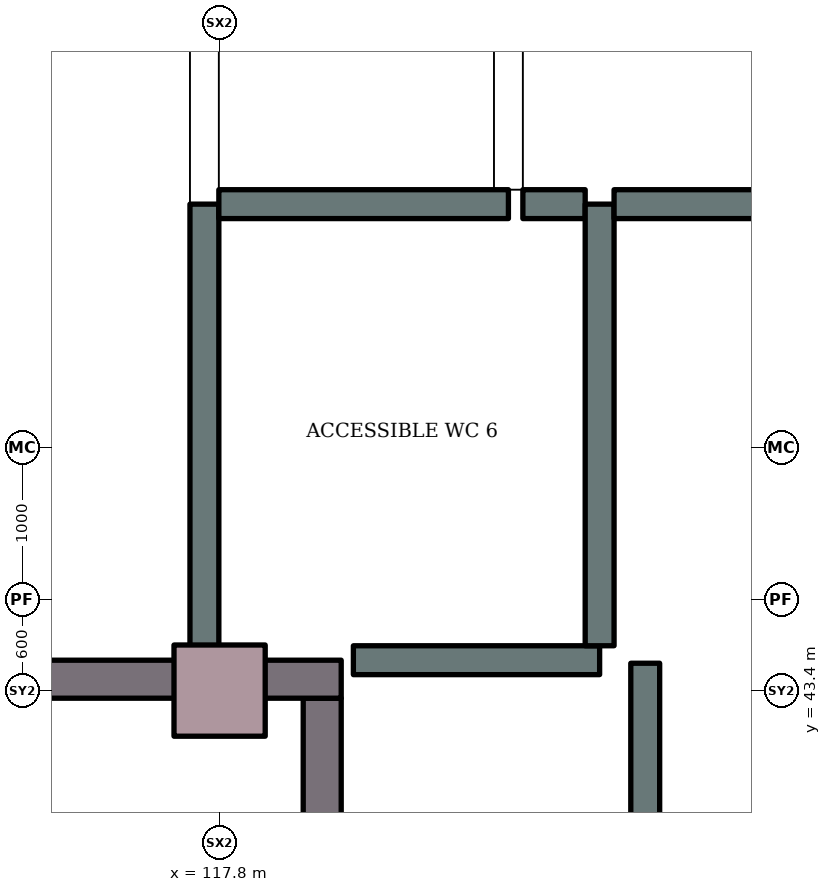
"""IFC4 building model, lengths in metres.
Left out: names, types, materials, properties, quantities, classifications, styles, units other than length and angle.
Written with IfcOpenShell. Run it as: python <this file> out.ifc"""

import sys

from ifc_helpers import new_model, si_unit, direction, frame, frame_2d, origin, origin_2d, place, context, subcontext, project, spatial, rectangle, extrude, element, fill, save


model = new_model("IFC4")
c1 = context("Model", 3, precision=1e-05, world=origin(), true_north=direction((0.0, 1.0)))
c2 = subcontext(c1, "Body", "Model", "MODEL_VIEW")
j1 = project(units=[si_unit("LENGTHUNIT", "METRE"), si_unit("PLANEANGLEUNIT", "RADIAN")], contexts=[c1])
p1 = place(None, origin())
s1 = spatial("IfcSite", under=j1, at=p1, CompositionType="ELEMENT")
p2 = place(p1, origin())
s2 = spatial("IfcBuilding", under=s1, at=p2, CompositionType="ELEMENT")
p3 = place(p2, origin())
s3 = spatial("IfcBuildingStorey", under=s2, at=p3, CompositionType="ELEMENT", Elevation=0.0)
p4 = place(p3, frame((117.8, 43.4, 0.0), z_axis=(0.0, 0.0, 1.0), x_axis=(1.0, 0.0, 0.0)))
e1 = element("IfcColumn", 1, at=p4, inside=s3, PredefinedType="COLUMN", context=c2, shape_type="SweptSolid", body=[
    extrude(rectangle(XDim=0.6, YDim=0.6, at=origin_2d()), origin(), (0.0, 0.0, 1.0), 4.2),
])
p5 = place(p3, frame((118.475, 38.4, 0.0), z_axis=(0.0, 0.0, 1.0), x_axis=(0.0, 1.0, 0.0)))
e2 = element("IfcWall", 2, at=p5, inside=s3, PredefinedType="SHEAR", context=c2, shape_type="SweptSolid", body=[
    extrude(rectangle(XDim=4.95, YDim=0.25, at=frame_2d((2.475, 0.0))), origin(), (0.0, 0.0, 1.0), 4.2),
])
p6 = place(p3, frame((112.4, 43.475, 0.0), z_axis=(0.0, 0.0, 1.0), x_axis=(1.0, 0.0, 0.0)))
e3 = element("IfcWall", 3, at=p6, inside=s3, PredefinedType="SHEAR", context=c2, shape_type="SweptSolid", body=[
    extrude(rectangle(XDim=6.2, YDim=0.25, at=frame_2d((3.1, 0.0))), origin(), (0.0, 0.0, 1.0), 4.2),
])
p7 = place(p6, frame((3.714, 0.0, 0.0)))
e4 = element("IfcOpeningElement", 4, at=p7, cuts=e3, PredefinedType="OPENING", context=c2, shape_type="SweptSolid", body=[
    extrude(rectangle(XDim=1.0, YDim=2.1, at=frame_2d((0.5, 1.05))), frame((0.0, 0.135, 0.0), z_axis=(0.0, -1.0, 0.0), x_axis=(1.0, 0.0, 0.0)), (0.0, 0.0, 1.0), 0.27),
])
p8 = place(p3, frame((117.7, 43.68, 0.0), z_axis=(0.0, 0.0, 1.0), x_axis=(0.0, 1.0, 0.0)))
e5 = element("IfcWall", 5, at=p8, inside=s3, PredefinedType="PARTITIONING", context=c2, shape_type="SweptSolid", body=[
    extrude(rectangle(XDim=2.92, YDim=0.19, at=frame_2d((1.46, 0.0))), origin(), (0.0, 0.0, 1.0), 3.9),
])
p9 = place(p3, frame((117.7, 46.6, 0.0), z_axis=(0.0, 0.0, 1.0), x_axis=(0.0, 1.0, 0.0)))
e6 = element("IfcWall", 6, at=p9, inside=s3, PredefinedType="PARTITIONING", context=c2, shape_type="SweptSolid", body=[
    extrude(rectangle(XDim=11.58, YDim=0.19, at=frame_2d((5.79, 0.0))), origin(), (0.0, 0.0, 1.0), 3.9),
])
p10 = place(p9, frame((5.35, 0.0, 0.0)))
e7 = element("IfcOpeningElement", 7, at=p10, cuts=e6, PredefinedType="OPENING", context=c2, shape_type="SweptSolid", body=[
    extrude(rectangle(XDim=1.0, YDim=2.1, at=frame_2d((0.5, 1.05))), frame((0.0, 0.105, 0.0), z_axis=(0.0, -1.0, 0.0), x_axis=(1.0, 0.0, 0.0)), (0.0, 0.0, 1.0), 0.21),
])
p11 = place(p3, frame((119.7, 46.6, 0.0), z_axis=(0.0, 0.0, 1.0), x_axis=(-1.0, 0.0, 0.0)))
e8 = element("IfcWall", 8, at=p11, inside=s3, PredefinedType="PARTITIONING", context=c2, shape_type="SweptSolid", body=[
    extrude(rectangle(XDim=1.905, YDim=0.19, at=frame_2d((0.953, 0.0))), origin(), (0.0, 0.0, 1.0), 3.9),
])
p12 = place(p11, frame((0.55, 0.0, 0.0)))
e9 = element("IfcOpeningElement", 9, at=p12, cuts=e8, PredefinedType="OPENING", context=c2, shape_type="SweptSolid", body=[
    extrude(rectangle(XDim=0.9, YDim=2.1, at=frame_2d((0.45, 1.05))), frame((0.0, 0.105, 0.0), z_axis=(0.0, -1.0, 0.0), x_axis=(1.0, 0.0, 0.0)), (0.0, 0.0, 1.0), 0.21),
])
p13 = place(p3, frame((119.7, 46.695, 0.0), z_axis=(0.0, 0.0, 1.0), x_axis=(0.0, 1.0, 0.0)))
e10 = element("IfcWall", 10, at=p13, inside=s3, PredefinedType="PARTITIONING", context=c2, shape_type="SweptSolid", body=[
    extrude(rectangle(XDim=6.305, YDim=0.19, at=frame_2d((3.152, 0.0))), origin(), (0.0, 0.0, 1.0), 3.9),
])
p14 = place(p13, frame((2.655, 0.0, 0.0)))
e11 = element("IfcOpeningElement", 11, at=p14, cuts=e10, PredefinedType="OPENING", context=c2, shape_type="SweptSolid", body=[
    extrude(rectangle(XDim=1.0, YDim=2.1, at=frame_2d((0.5, 1.05))), frame((0.0, 0.105, 0.0), z_axis=(0.0, -1.0, 0.0), x_axis=(1.0, 0.0, 0.0)), (0.0, 0.0, 1.0), 0.21),
])
p15 = place(p3, frame((120.205, 46.6, 0.0), z_axis=(0.0, 0.0, 1.0), x_axis=(-1.0, 0.0, 0.0)))
e12 = element("IfcWall", 12, at=p15, inside=s3, PredefinedType="PARTITIONING", context=c2, shape_type="SweptSolid", body=[
    extrude(rectangle(XDim=0.41, YDim=0.19, at=frame_2d((0.205, 0.0))), origin(), (0.0, 0.0, 1.0), 3.9),
])
p16 = place(p3, frame((120.3, 43.6, 0.0), z_axis=(0.0, 0.0, 1.0), x_axis=(-1.0, 0.0, 0.0)))
e13 = element("IfcWall", 13, at=p16, inside=s3, PredefinedType="PARTITIONING", context=c2, shape_type="SweptSolid", body=[
    extrude(rectangle(XDim=1.62, YDim=0.19, at=frame_2d((0.81, 0.0))), origin(), (0.0, 0.0, 1.0), 3.9),
])
p17 = place(p3, frame((120.3, 43.695, 0.0), z_axis=(0.0, 0.0, 1.0), x_axis=(0.0, 1.0, 0.0)))
e14 = element("IfcWall", 14, at=p17, inside=s3, PredefinedType="PARTITIONING", context=c2, shape_type="SweptSolid", body=[
    extrude(rectangle(XDim=2.905, YDim=0.19, at=frame_2d((1.453, 0.0))), origin(), (0.0, 0.0, 1.0), 3.9),
])
p18 = place(p17, frame((0.955, 0.0, 0.0)))
e15 = element("IfcOpeningElement", 15, at=p18, cuts=e14, PredefinedType="OPENING", context=c2, shape_type="SweptSolid", body=[
    extrude(rectangle(XDim=0.9, YDim=2.1, at=frame_2d((0.45, 1.05))), frame((0.0, 0.105, 0.0), z_axis=(0.0, -1.0, 0.0), x_axis=(1.0, 0.0, 0.0)), (0.0, 0.0, 1.0), 0.21),
])
p19 = place(p3, frame((120.6, 41.68, 0.0), z_axis=(0.0, 0.0, 1.0), x_axis=(0.0, 1.0, 0.0)))
e16 = element("IfcWall", 16, at=p19, inside=s3, PredefinedType="PARTITIONING", context=c2, shape_type="SweptSolid", body=[
    extrude(rectangle(XDim=1.9, YDim=0.19, at=frame_2d((0.95, 0.0))), origin(), (0.0, 0.0, 1.0), 3.9),
])
p20 = place(p19, frame((0.47, 0.0, 0.0)))
e17 = element("IfcOpeningElement", 17, at=p20, cuts=e16, PredefinedType="OPENING", context=c2, shape_type="SweptSolid", body=[
    extrude(rectangle(XDim=1.0, YDim=2.1, at=frame_2d((0.5, 1.05))), frame((0.0, 0.105, 0.0), z_axis=(0.0, -1.0, 0.0), x_axis=(1.0, 0.0, 0.0)), (0.0, 0.0, 1.0), 0.21),
])
p21 = place(p3, frame((124.85, 46.6, 0.0), z_axis=(0.0, 0.0, 1.0), x_axis=(-1.0, 0.0, 0.0)))
e18 = element("IfcWall", 18, at=p21, inside=s3, PredefinedType="PARTITIONING", context=c2, shape_type="SweptSolid", body=[
    extrude(rectangle(XDim=4.455, YDim=0.19, at=frame_2d((2.228, 0.0))), origin(), (0.0, 0.0, 1.0), 3.9),
])
p22 = place(p21, frame((1.8, 0.0, 0.0)))
e19 = element("IfcOpeningElement", 19, at=p22, cuts=e18, PredefinedType="OPENING", context=c2, shape_type="SweptSolid", body=[
    extrude(rectangle(XDim=1.0, YDim=2.1, at=frame_2d((0.5, 1.05))), frame((0.0, 0.105, 0.0), z_axis=(0.0, -1.0, 0.0), x_axis=(1.0, 0.0, 0.0)), (0.0, 0.0, 1.0), 0.21),
])
p23 = place(p20, origin())
e20 = element("IfcDoor", 20, at=p23, inside=s3, OperationType="SINGLE_SWING_LEFT", PredefinedType="DOOR", context=c2, shape_type="SweptSolid", body=[
    extrude(rectangle(XDim=1.0, YDim=2.1, at=frame_2d((0.5, 1.05))), frame((0.0, 0.025, 0.0), z_axis=(0.0, -1.0, 0.0), x_axis=(1.0, 0.0, 0.0)), (0.0, 0.0, 1.0), 0.05),
])
fill(e17, e20)
p24 = place(p7, origin())
e21 = element("IfcDoor", 21, at=p24, inside=s3, OperationType="SINGLE_SWING_LEFT", PredefinedType="DOOR", context=c2, shape_type="SweptSolid", body=[
    extrude(rectangle(XDim=1.0, YDim=2.1, at=frame_2d((0.5, 1.05))), frame((0.0, 0.025, 0.0), z_axis=(0.0, -1.0, 0.0), x_axis=(1.0, 0.0, 0.0)), (0.0, 0.0, 1.0), 0.05),
])
fill(e4, e21)
p25 = place(p18, origin())
e22 = element("IfcDoor", 22, at=p25, inside=s3, OperationType="SINGLE_SWING_LEFT", PredefinedType="DOOR", context=c2, shape_type="SweptSolid", body=[
    extrude(rectangle(XDim=0.9, YDim=2.1, at=frame_2d((0.45, 1.05))), frame((0.0, 0.025, 0.0), z_axis=(0.0, -1.0, 0.0), x_axis=(1.0, 0.0, 0.0)), (0.0, 0.0, 1.0), 0.05),
])
fill(e15, e22)
p26 = place(p12, origin())
e23 = element("IfcDoor", 23, at=p26, inside=s3, OperationType="SINGLE_SWING_LEFT", PredefinedType="DOOR", context=c2, shape_type="SweptSolid", body=[
    extrude(rectangle(XDim=0.9, YDim=2.1, at=frame_2d((0.45, 1.05))), frame((0.0, 0.025, 0.0), z_axis=(0.0, -1.0, 0.0), x_axis=(1.0, 0.0, 0.0)), (0.0, 0.0, 1.0), 0.05),
])
fill(e9, e23)
save(model, sys.argv[1])
